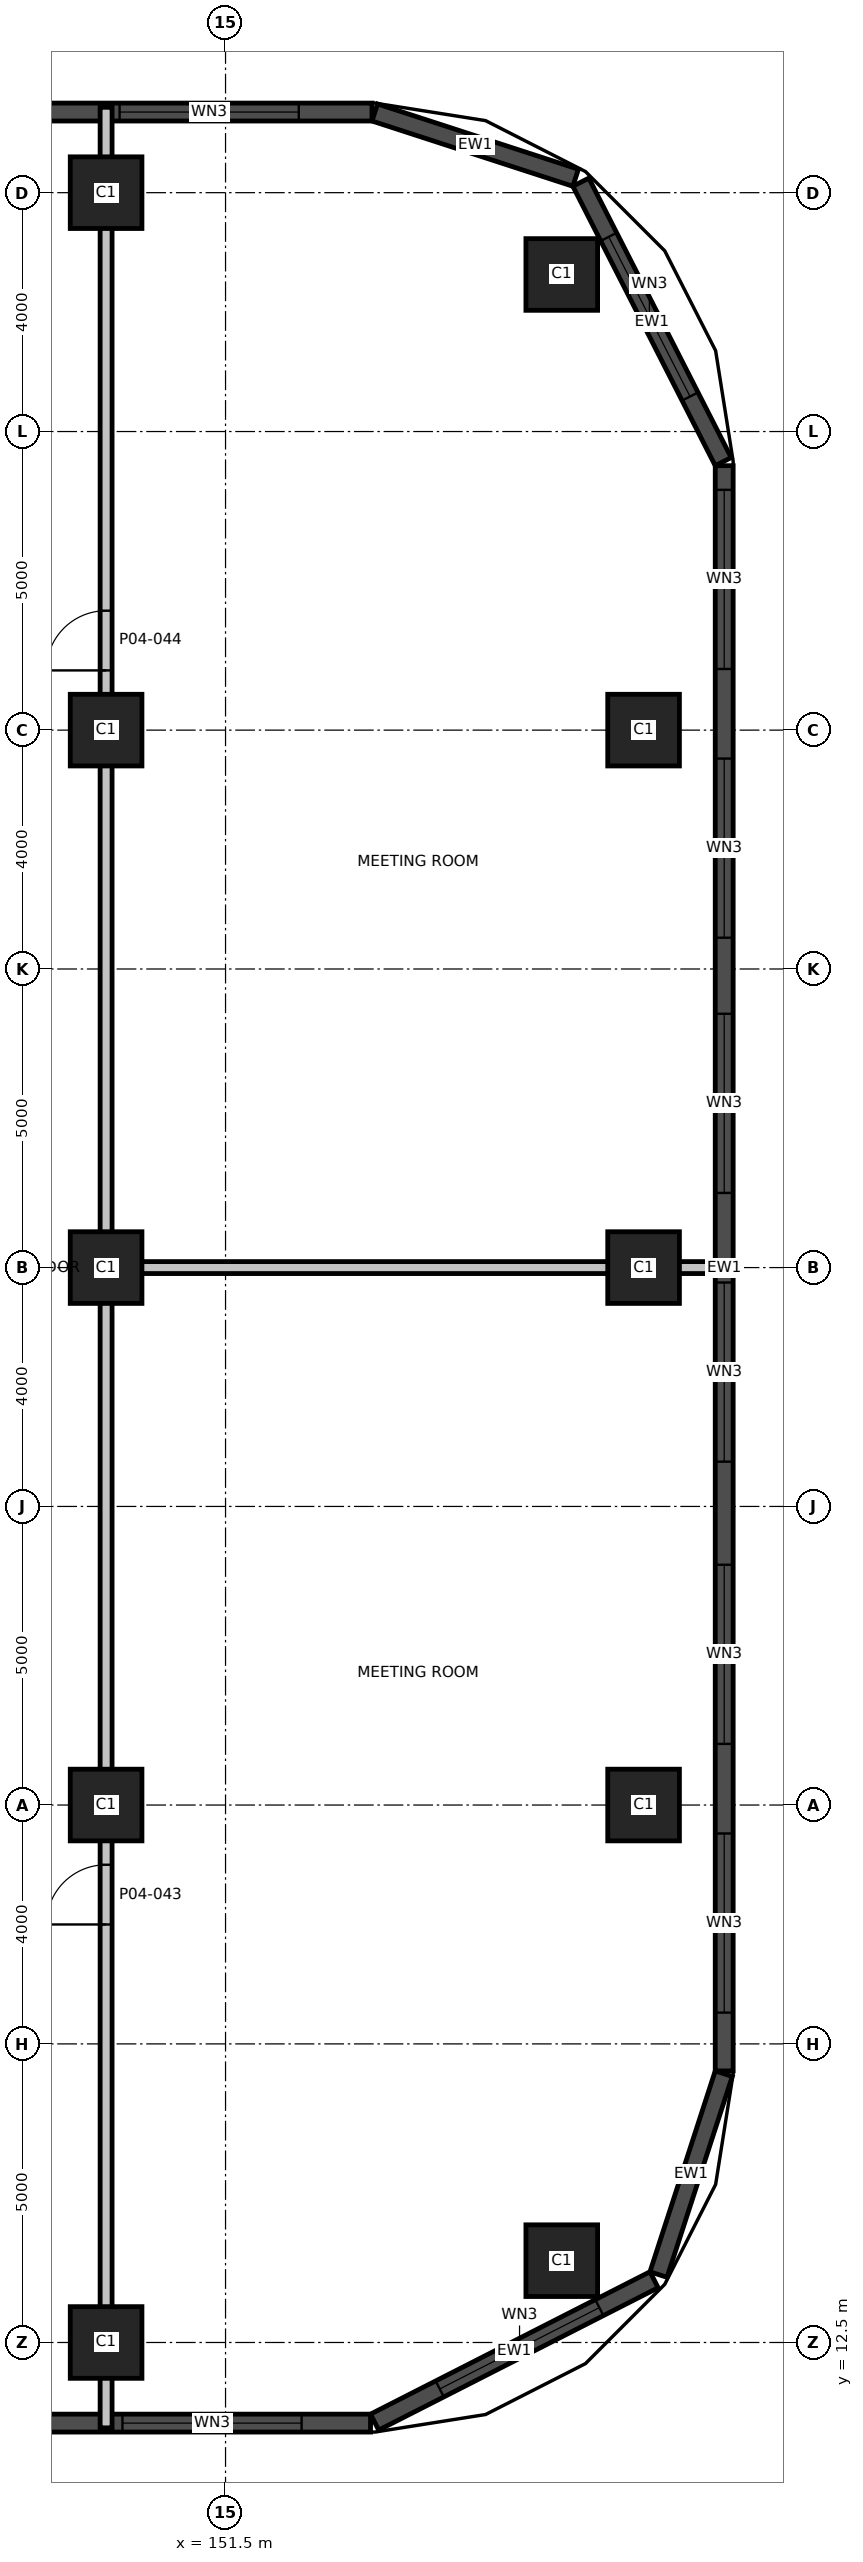
"""IFC4 building model, lengths in metres.
Left out: names, types, materials, properties, quantities, classifications, styles, units other than length and angle.
Written with IfcOpenShell. Run it as: python <this file> out.ifc"""

import sys

from ifc_helpers import new_model, si_unit, direction, frame, frame_2d, origin, origin_2d, place, context, subcontext, project, spatial, rectangle, extrude, element, fill, save


model = new_model("IFC4")
c1 = context("Model", 3, precision=1e-05, world=origin(), true_north=direction((0.0, 1.0)))
c2 = subcontext(c1, "Body", "Model", "MODEL_VIEW")
j1 = project(units=[si_unit("LENGTHUNIT", "METRE"), si_unit("PLANEANGLEUNIT", "RADIAN")], contexts=[c1])
p1 = place(None, origin())
s1 = spatial("IfcSite", under=j1, at=p1, CompositionType="ELEMENT")
p2 = place(p1, origin())
s2 = spatial("IfcBuilding", under=s1, at=p2, CompositionType="ELEMENT")
p3 = place(p2, frame((0.0, 0.0, 23.5)))
s3 = spatial("IfcBuildingStorey", under=s2, at=p3, CompositionType="ELEMENT", Elevation=23.5)
for number, where, z_axis, x_axis in (
    (1, (149.5, 12.5, 0.0), (0.0, 0.0, 1.0), (1.0, 0.0, 0.0)),
    (2, (157.13, 13.87, 0.0), (0.0, 0.0, 1.0), (1.0, 0.0, 0.0)),
    (3, (149.5, 21.5, 0.0), (0.0, 0.0, 1.0), (1.0, 0.0, 0.0)),
    (4, (158.5, 21.5, 0.0), (0.0, 0.0, 1.0), (1.0, 0.0, 0.0)),
    (5, (149.5, 30.5, 0.0), (0.0, 0.0, 1.0), (1.0, 0.0, 0.0)),
    (6, (158.5, 30.5, 0.0), (0.0, 0.0, 1.0), (1.0, 0.0, 0.0)),
    (7, (149.5, 39.5, 0.0), (0.0, 0.0, 1.0), (1.0, 0.0, 0.0)),
    (8, (158.5, 39.5, 0.0), (0.0, 0.0, 1.0), (1.0, 0.0, 0.0)),
    (9, (157.13, 47.13, 0.0), (0.0, 0.0, 1.0), (1.0, 0.0, 0.0)),
    (10, (149.5, 48.5, 0.0), (0.0, 0.0, 1.0), (1.0, 0.0, 0.0)),
):
    element("IfcColumn", number, at=place(p3, frame(where, z_axis=z_axis, x_axis=x_axis)), inside=s3, PredefinedType="COLUMN", context=c2, shape_type="SweptSolid", body=[
        extrude(rectangle(XDim=1.2, YDim=1.2, at=origin_2d()), origin(), (0.0, 0.0, 1.0), 5.0),
    ])
p4 = place(p3, frame((118.048, 11.15, 0.0), z_axis=(0.0, 0.0, 1.0), x_axis=(1.0, 0.0, 0.0)))
e11 = element("IfcWall", 11, at=p4, inside=s3, PredefinedType="SOLIDWALL", context=c2, shape_type="SweptSolid", body=[
    extrude(rectangle(XDim=35.88, YDim=0.3, at=frame_2d((17.94, 0.0))), origin(), (0.0, 0.0, 1.0), 4.7),
])
p5 = place(p4, frame((4.202, 0.0, 0.9)))
e12 = element("IfcOpeningElement", 12, at=p5, cuts=e11, PredefinedType="OPENING", context=c2, shape_type="SweptSolid", body=[
    extrude(rectangle(XDim=3.0, YDim=2.4, at=frame_2d((1.5, 1.2))), frame((0.0, 0.16, 0.0), z_axis=(0.0, -1.0, 0.0), x_axis=(1.0, 0.0, 0.0)), (0.0, 0.0, 1.0), 0.32),
])
p6 = place(p4, frame((8.702, 0.0, 0.9)))
e13 = element("IfcOpeningElement", 13, at=p6, cuts=e11, PredefinedType="OPENING", context=c2, shape_type="SweptSolid", body=[
    extrude(rectangle(XDim=3.0, YDim=2.4, at=frame_2d((1.5, 1.2))), frame((0.0, 0.16, 0.0), z_axis=(0.0, -1.0, 0.0), x_axis=(1.0, 0.0, 0.0)), (0.0, 0.0, 1.0), 0.32),
])
p7 = place(p4, frame((13.202, 0.0, 0.9)))
e14 = element("IfcOpeningElement", 14, at=p7, cuts=e11, PredefinedType="OPENING", context=c2, shape_type="SweptSolid", body=[
    extrude(rectangle(XDim=3.0, YDim=2.4, at=frame_2d((1.5, 1.2))), frame((0.0, 0.16, 0.0), z_axis=(0.0, -1.0, 0.0), x_axis=(1.0, 0.0, 0.0)), (0.0, 0.0, 1.0), 0.32),
])
p8 = place(p4, frame((17.702, 0.0, 0.9)))
e15 = element("IfcOpeningElement", 15, at=p8, cuts=e11, PredefinedType="OPENING", context=c2, shape_type="SweptSolid", body=[
    extrude(rectangle(XDim=3.0, YDim=2.4, at=frame_2d((1.5, 1.2))), frame((0.0, 0.16, 0.0), z_axis=(0.0, -1.0, 0.0), x_axis=(1.0, 0.0, 0.0)), (0.0, 0.0, 1.0), 0.32),
])
p9 = place(p4, frame((22.202, 0.0, 0.9)))
e16 = element("IfcOpeningElement", 16, at=p9, cuts=e11, PredefinedType="OPENING", context=c2, shape_type="SweptSolid", body=[
    extrude(rectangle(XDim=3.0, YDim=2.4, at=frame_2d((1.5, 1.2))), frame((0.0, 0.16, 0.0), z_axis=(0.0, -1.0, 0.0), x_axis=(1.0, 0.0, 0.0)), (0.0, 0.0, 1.0), 0.32),
])
p10 = place(p4, frame((31.726, 0.0, 0.9)))
e17 = element("IfcOpeningElement", 17, at=p10, cuts=e11, PredefinedType="OPENING", context=c2, shape_type="SweptSolid", body=[
    extrude(rectangle(XDim=3.0, YDim=2.4, at=frame_2d((1.5, 1.2))), frame((0.0, 0.16, 0.0), z_axis=(0.0, -1.0, 0.0), x_axis=(1.0, 0.0, 0.0)), (0.0, 0.0, 1.0), 0.32),
])
p11 = place(p3, frame((153.996, 11.166, 0.0), z_axis=(0.0, 0.0, 1.0), x_axis=(0.890998339455, 0.454006562826, 0.0)))
e18 = element("IfcWall", 18, at=p11, inside=s3, PredefinedType="SOLIDWALL", context=c2, shape_type="SweptSolid", body=[
    extrude(rectangle(XDim=5.252, YDim=0.3, at=frame_2d((2.626, 0.0))), origin(), (0.0, 0.0, 1.0), 4.7),
])
p12 = place(p11, frame((1.224, 0.0, 0.9)))
e19 = element("IfcOpeningElement", 19, at=p12, cuts=e18, PredefinedType="OPENING", context=c2, shape_type="SweptSolid", body=[
    extrude(rectangle(XDim=3.0, YDim=2.4, at=frame_2d((1.5, 1.2))), frame((0.0, 0.16, 0.0), z_axis=(0.0, -1.0, 0.0), x_axis=(1.0, 0.0, 0.0)), (0.0, 0.0, 1.0), 0.32),
])
p13 = place(p3, frame((158.75, 13.638, 0.0), z_axis=(0.0, 0.0, 1.0), x_axis=(0.309073584194, 0.951038127287, 0.0)))
e20 = element("IfcWall", 20, at=p13, inside=s3, PredefinedType="SOLIDWALL", context=c2, shape_type="SweptSolid", body=[
    extrude(rectangle(XDim=3.536, YDim=0.3, at=frame_2d((1.768, 0.0))), origin(), (0.0, 0.0, 1.0), 4.7),
])
p14 = place(p3, frame((159.85, 17.048, 0.0), z_axis=(0.0, 0.0, 1.0), x_axis=(0.0, 1.0, 0.0)))
e21 = element("IfcWall", 21, at=p14, inside=s3, PredefinedType="SOLIDWALL", context=c2, shape_type="SweptSolid", body=[
    extrude(rectangle(XDim=26.88, YDim=0.3, at=frame_2d((13.44, 0.0))), origin(), (0.0, 0.0, 1.0), 4.7),
])
p15 = place(p14, frame((0.976, 0.0, 0.9)))
e22 = element("IfcOpeningElement", 22, at=p15, cuts=e21, PredefinedType="OPENING", context=c2, shape_type="SweptSolid", body=[
    extrude(rectangle(XDim=3.0, YDim=2.4, at=frame_2d((1.5, 1.2))), frame((0.0, 0.16, 0.0), z_axis=(0.0, -1.0, 0.0), x_axis=(1.0, 0.0, 0.0)), (0.0, 0.0, 1.0), 0.32),
])
p16 = place(p14, frame((5.476, 0.0, 0.9)))
e23 = element("IfcOpeningElement", 23, at=p16, cuts=e21, PredefinedType="OPENING", context=c2, shape_type="SweptSolid", body=[
    extrude(rectangle(XDim=3.0, YDim=2.4, at=frame_2d((1.5, 1.2))), frame((0.0, 0.16, 0.0), z_axis=(0.0, -1.0, 0.0), x_axis=(1.0, 0.0, 0.0)), (0.0, 0.0, 1.0), 0.32),
])
p17 = place(p14, frame((10.202, 0.0, 0.9)))
e24 = element("IfcOpeningElement", 24, at=p17, cuts=e21, PredefinedType="OPENING", context=c2, shape_type="SweptSolid", body=[
    extrude(rectangle(XDim=3.0, YDim=2.4, at=frame_2d((1.5, 1.2))), frame((0.0, 0.16, 0.0), z_axis=(0.0, -1.0, 0.0), x_axis=(1.0, 0.0, 0.0)), (0.0, 0.0, 1.0), 0.32),
])
p18 = place(p14, frame((14.702, 0.0, 0.9)))
e25 = element("IfcOpeningElement", 25, at=p18, cuts=e21, PredefinedType="OPENING", context=c2, shape_type="SweptSolid", body=[
    extrude(rectangle(XDim=3.0, YDim=2.4, at=frame_2d((1.5, 1.2))), frame((0.0, 0.16, 0.0), z_axis=(0.0, -1.0, 0.0), x_axis=(1.0, 0.0, 0.0)), (0.0, 0.0, 1.0), 0.32),
])
p19 = place(p14, frame((18.976, 0.0, 0.9)))
e26 = element("IfcOpeningElement", 26, at=p19, cuts=e21, PredefinedType="OPENING", context=c2, shape_type="SweptSolid", body=[
    extrude(rectangle(XDim=3.0, YDim=2.4, at=frame_2d((1.5, 1.2))), frame((0.0, 0.16, 0.0), z_axis=(0.0, -1.0, 0.0), x_axis=(1.0, 0.0, 0.0)), (0.0, 0.0, 1.0), 0.32),
])
p20 = place(p14, frame((23.476, 0.0, 0.9)))
e27 = element("IfcOpeningElement", 27, at=p20, cuts=e21, PredefinedType="OPENING", context=c2, shape_type="SweptSolid", body=[
    extrude(rectangle(XDim=3.0, YDim=2.4, at=frame_2d((1.5, 1.2))), frame((0.0, 0.16, 0.0), z_axis=(0.0, -1.0, 0.0), x_axis=(1.0, 0.0, 0.0)), (0.0, 0.0, 1.0), 0.32),
])
p21 = place(p3, frame((159.834, 43.996, 0.0), z_axis=(0.0, 0.0, 1.0), x_axis=(-0.454006562826, 0.890998339455, 0.0)))
e28 = element("IfcWall", 28, at=p21, inside=s3, PredefinedType="SOLIDWALL", context=c2, shape_type="SweptSolid", body=[
    extrude(rectangle(XDim=5.252, YDim=0.3, at=frame_2d((2.626, 0.0))), origin(), (0.0, 0.0, 1.0), 4.7),
])
p22 = place(p21, frame((1.224, 0.0, 0.9)))
e29 = element("IfcOpeningElement", 29, at=p22, cuts=e28, PredefinedType="OPENING", context=c2, shape_type="SweptSolid", body=[
    extrude(rectangle(XDim=3.0, YDim=2.4, at=frame_2d((1.5, 1.2))), frame((0.0, 0.16, 0.0), z_axis=(0.0, -1.0, 0.0), x_axis=(1.0, 0.0, 0.0)), (0.0, 0.0, 1.0), 0.32),
])
p23 = place(p3, frame((157.362, 48.75, 0.0), z_axis=(0.0, 0.0, 1.0), x_axis=(-0.951038127287, 0.309073584194, 0.0)))
e30 = element("IfcWall", 30, at=p23, inside=s3, PredefinedType="SOLIDWALL", context=c2, shape_type="SweptSolid", body=[
    extrude(rectangle(XDim=3.536, YDim=0.3, at=frame_2d((1.768, 0.0))), origin(), (0.0, 0.0, 1.0), 4.7),
])
p24 = place(p3, frame((153.952, 49.85, 0.0), z_axis=(0.0, 0.0, 1.0), x_axis=(-1.0, 0.0, 0.0)))
e31 = element("IfcWall", 31, at=p24, inside=s3, PredefinedType="SOLIDWALL", context=c2, shape_type="SweptSolid", body=[
    extrude(rectangle(XDim=35.88, YDim=0.3, at=frame_2d((17.94, 0.0))), origin(), (0.0, 0.0, 1.0), 4.7),
])
p25 = place(p24, frame((1.226, 0.0, 0.9)))
e32 = element("IfcOpeningElement", 32, at=p25, cuts=e31, PredefinedType="OPENING", context=c2, shape_type="SweptSolid", body=[
    extrude(rectangle(XDim=3.0, YDim=2.4, at=frame_2d((1.5, 1.2))), frame((0.0, 0.16, 0.0), z_axis=(0.0, -1.0, 0.0), x_axis=(1.0, 0.0, 0.0)), (0.0, 0.0, 1.0), 0.32),
])
p26 = place(p24, frame((10.702, 0.0, 0.9)))
e33 = element("IfcOpeningElement", 33, at=p26, cuts=e31, PredefinedType="OPENING", context=c2, shape_type="SweptSolid", body=[
    extrude(rectangle(XDim=3.0, YDim=2.4, at=frame_2d((1.5, 1.2))), frame((0.0, 0.16, 0.0), z_axis=(0.0, -1.0, 0.0), x_axis=(1.0, 0.0, 0.0)), (0.0, 0.0, 1.0), 0.32),
])
p27 = place(p24, frame((15.202, 0.0, 0.9)))
e34 = element("IfcOpeningElement", 34, at=p27, cuts=e31, PredefinedType="OPENING", context=c2, shape_type="SweptSolid", body=[
    extrude(rectangle(XDim=3.0, YDim=2.4, at=frame_2d((1.5, 1.2))), frame((0.0, 0.16, 0.0), z_axis=(0.0, -1.0, 0.0), x_axis=(1.0, 0.0, 0.0)), (0.0, 0.0, 1.0), 0.32),
])
p28 = place(p24, frame((19.702, 0.0, 0.9)))
e35 = element("IfcOpeningElement", 35, at=p28, cuts=e31, PredefinedType="OPENING", context=c2, shape_type="SweptSolid", body=[
    extrude(rectangle(XDim=3.0, YDim=2.4, at=frame_2d((1.5, 1.2))), frame((0.0, 0.16, 0.0), z_axis=(0.0, -1.0, 0.0), x_axis=(1.0, 0.0, 0.0)), (0.0, 0.0, 1.0), 0.32),
])
p29 = place(p24, frame((24.202, 0.0, 0.9)))
e36 = element("IfcOpeningElement", 36, at=p29, cuts=e31, PredefinedType="OPENING", context=c2, shape_type="SweptSolid", body=[
    extrude(rectangle(XDim=3.0, YDim=2.4, at=frame_2d((1.5, 1.2))), frame((0.0, 0.16, 0.0), z_axis=(0.0, -1.0, 0.0), x_axis=(1.0, 0.0, 0.0)), (0.0, 0.0, 1.0), 0.32),
])
p30 = place(p24, frame((28.702, 0.0, 0.9)))
e37 = element("IfcOpeningElement", 37, at=p30, cuts=e31, PredefinedType="OPENING", context=c2, shape_type="SweptSolid", body=[
    extrude(rectangle(XDim=3.0, YDim=2.4, at=frame_2d((1.5, 1.2))), frame((0.0, 0.16, 0.0), z_axis=(0.0, -1.0, 0.0), x_axis=(1.0, 0.0, 0.0)), (0.0, 0.0, 1.0), 0.32),
])
p31 = place(p3, frame((149.5, 30.5, 0.0), z_axis=(0.0, 0.0, 1.0), x_axis=(1.0, 0.0, 0.0)))
e38 = element("IfcWall", 38, at=p31, inside=s3, PredefinedType="PARTITIONING", context=c2, shape_type="SweptSolid", body=[
    extrude(rectangle(XDim=10.43, YDim=0.2, at=frame_2d((5.215, 0.0))), origin(), (0.0, 0.0, 1.0), 4.7),
])
p32 = place(p3, frame((149.5, 11.07, 0.0), z_axis=(0.0, 0.0, 1.0), x_axis=(0.0, 1.0, 0.0)))
e39 = element("IfcWall", 39, at=p32, inside=s3, PredefinedType="PARTITIONING", context=c2, shape_type="SweptSolid", body=[
    extrude(rectangle(XDim=38.86, YDim=0.2, at=frame_2d((19.43, 0.0))), origin(), (0.0, 0.0, 1.0), 4.7),
])
p33 = place(p32, frame((8.43, 0.0, 0.0)))
e40 = element("IfcOpeningElement", 40, at=p33, cuts=e39, PredefinedType="OPENING", context=c2, shape_type="SweptSolid", body=[
    extrude(rectangle(XDim=1.0, YDim=2.1, at=frame_2d((0.5, 1.05))), frame((0.0, 0.11, 0.0), z_axis=(0.0, -1.0, 0.0), x_axis=(1.0, 0.0, 0.0)), (0.0, 0.0, 1.0), 0.22),
])
p34 = place(p32, frame((29.43, 0.0, 0.0)))
e41 = element("IfcOpeningElement", 41, at=p34, cuts=e39, PredefinedType="OPENING", context=c2, shape_type="SweptSolid", body=[
    extrude(rectangle(XDim=1.0, YDim=2.1, at=frame_2d((0.5, 1.05))), frame((0.0, 0.11, 0.0), z_axis=(0.0, -1.0, 0.0), x_axis=(1.0, 0.0, 0.0)), (0.0, 0.0, 1.0), 0.22),
])
p35 = place(p10, origin())
e42 = element("IfcWindow", 42, at=p35, inside=s3, PartitioningType="SINGLE_PANEL", PredefinedType="WINDOW", context=c2, shape_type="SweptSolid", body=[
    extrude(rectangle(XDim=3.0, YDim=2.4, at=frame_2d((1.5, 1.2))), frame((0.0, 0.03, 0.0), z_axis=(0.0, -1.0, 0.0), x_axis=(1.0, 0.0, 0.0)), (0.0, 0.0, 1.0), 0.06),
])
fill(e17, e42)
p36 = place(p12, origin())
e43 = element("IfcWindow", 43, at=p36, inside=s3, PartitioningType="SINGLE_PANEL", PredefinedType="WINDOW", context=c2, shape_type="SweptSolid", body=[
    extrude(rectangle(XDim=3.0, YDim=2.4, at=frame_2d((1.5, 1.2))), frame((0.0, 0.03, 0.0), z_axis=(0.0, -1.0, 0.0), x_axis=(1.0, 0.0, 0.0)), (0.0, 0.0, 1.0), 0.06),
])
fill(e19, e43)
p37 = place(p15, origin())
e44 = element("IfcWindow", 44, at=p37, inside=s3, PartitioningType="SINGLE_PANEL", PredefinedType="WINDOW", context=c2, shape_type="SweptSolid", body=[
    extrude(rectangle(XDim=3.0, YDim=2.4, at=frame_2d((1.5, 1.2))), frame((0.0, 0.03, 0.0), z_axis=(0.0, -1.0, 0.0), x_axis=(1.0, 0.0, 0.0)), (0.0, 0.0, 1.0), 0.06),
])
fill(e22, e44)
p38 = place(p16, origin())
e45 = element("IfcWindow", 45, at=p38, inside=s3, PartitioningType="SINGLE_PANEL", PredefinedType="WINDOW", context=c2, shape_type="SweptSolid", body=[
    extrude(rectangle(XDim=3.0, YDim=2.4, at=frame_2d((1.5, 1.2))), frame((0.0, 0.03, 0.0), z_axis=(0.0, -1.0, 0.0), x_axis=(1.0, 0.0, 0.0)), (0.0, 0.0, 1.0), 0.06),
])
fill(e23, e45)
p39 = place(p17, origin())
e46 = element("IfcWindow", 46, at=p39, inside=s3, PartitioningType="SINGLE_PANEL", PredefinedType="WINDOW", context=c2, shape_type="SweptSolid", body=[
    extrude(rectangle(XDim=3.0, YDim=2.4, at=frame_2d((1.5, 1.2))), frame((0.0, 0.03, 0.0), z_axis=(0.0, -1.0, 0.0), x_axis=(1.0, 0.0, 0.0)), (0.0, 0.0, 1.0), 0.06),
])
fill(e24, e46)
p40 = place(p18, origin())
e47 = element("IfcWindow", 47, at=p40, inside=s3, PartitioningType="SINGLE_PANEL", PredefinedType="WINDOW", context=c2, shape_type="SweptSolid", body=[
    extrude(rectangle(XDim=3.0, YDim=2.4, at=frame_2d((1.5, 1.2))), frame((0.0, 0.03, 0.0), z_axis=(0.0, -1.0, 0.0), x_axis=(1.0, 0.0, 0.0)), (0.0, 0.0, 1.0), 0.06),
])
fill(e25, e47)
p41 = place(p19, origin())
e48 = element("IfcWindow", 48, at=p41, inside=s3, PartitioningType="SINGLE_PANEL", PredefinedType="WINDOW", context=c2, shape_type="SweptSolid", body=[
    extrude(rectangle(XDim=3.0, YDim=2.4, at=frame_2d((1.5, 1.2))), frame((0.0, 0.03, 0.0), z_axis=(0.0, -1.0, 0.0), x_axis=(1.0, 0.0, 0.0)), (0.0, 0.0, 1.0), 0.06),
])
fill(e26, e48)
p42 = place(p20, origin())
e49 = element("IfcWindow", 49, at=p42, inside=s3, PartitioningType="SINGLE_PANEL", PredefinedType="WINDOW", context=c2, shape_type="SweptSolid", body=[
    extrude(rectangle(XDim=3.0, YDim=2.4, at=frame_2d((1.5, 1.2))), frame((0.0, 0.03, 0.0), z_axis=(0.0, -1.0, 0.0), x_axis=(1.0, 0.0, 0.0)), (0.0, 0.0, 1.0), 0.06),
])
fill(e27, e49)
p43 = place(p22, origin())
e50 = element("IfcWindow", 50, at=p43, inside=s3, PartitioningType="SINGLE_PANEL", PredefinedType="WINDOW", context=c2, shape_type="SweptSolid", body=[
    extrude(rectangle(XDim=3.0, YDim=2.4, at=frame_2d((1.5, 1.2))), frame((0.0, 0.03, 0.0), z_axis=(0.0, -1.0, 0.0), x_axis=(1.0, 0.0, 0.0)), (0.0, 0.0, 1.0), 0.06),
])
fill(e29, e50)
p44 = place(p25, origin())
e51 = element("IfcWindow", 51, at=p44, inside=s3, PartitioningType="SINGLE_PANEL", PredefinedType="WINDOW", context=c2, shape_type="SweptSolid", body=[
    extrude(rectangle(XDim=3.0, YDim=2.4, at=frame_2d((1.5, 1.2))), frame((0.0, 0.03, 0.0), z_axis=(0.0, -1.0, 0.0), x_axis=(1.0, 0.0, 0.0)), (0.0, 0.0, 1.0), 0.06),
])
fill(e32, e51)
p45 = place(p33, origin())
e52 = element("IfcDoor", 52, at=p45, inside=s3, OperationType="SINGLE_SWING_LEFT", PredefinedType="DOOR", context=c2, shape_type="SweptSolid", body=[
    extrude(rectangle(XDim=1.0, YDim=2.1, at=frame_2d((0.5, 1.05))), frame((0.0, 0.025, 0.0), z_axis=(0.0, -1.0, 0.0), x_axis=(1.0, 0.0, 0.0)), (0.0, 0.0, 1.0), 0.05),
])
fill(e40, e52)
p46 = place(p34, origin())
e53 = element("IfcDoor", 53, at=p46, inside=s3, OperationType="SINGLE_SWING_RIGHT", PredefinedType="DOOR", context=c2, shape_type="SweptSolid", body=[
    extrude(rectangle(XDim=1.0, YDim=2.1, at=frame_2d((0.5, 1.05))), frame((0.0, 0.025, 0.0), z_axis=(0.0, -1.0, 0.0), x_axis=(1.0, 0.0, 0.0)), (0.0, 0.0, 1.0), 0.05),
])
fill(e41, e53)
save(model, sys.argv[1])
